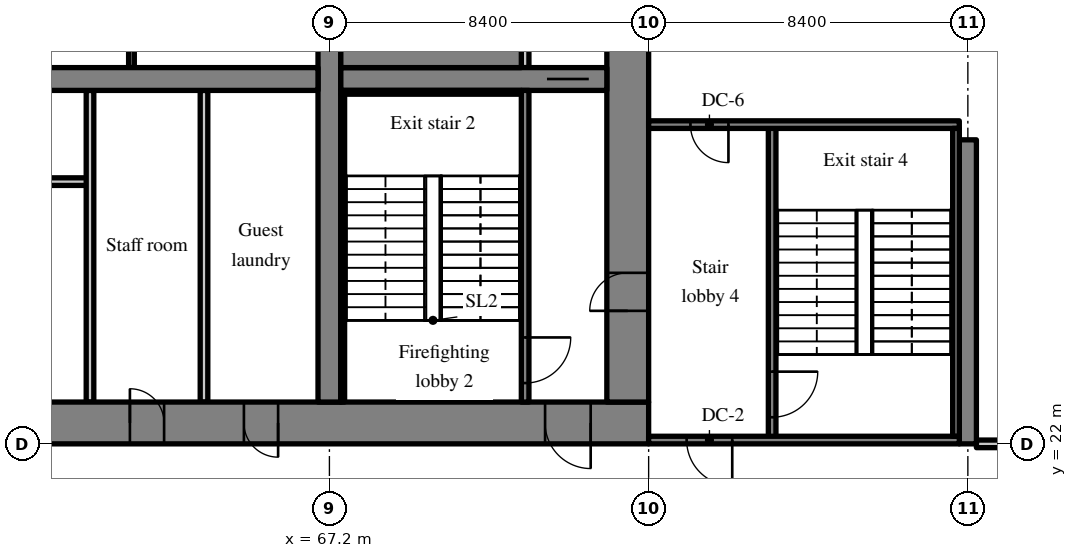
"""IFC4 building model, lengths in metres.
Left out: names, types, materials, properties, quantities, classifications, styles, units other than length and angle.
Written with IfcOpenShell. Run it as: python <this file> out.ifc"""

import sys

from ifc_helpers import new_model, si_unit, direction, frame, frame_2d, origin, place, context, subcontext, project, spatial, rectangle, extrude, source, transform, mapped, element, fill, save


model = new_model("IFC4")
c1 = context("Model", 3, precision=1e-05, world=origin(), true_north=direction((0.0, 1.0)))
c2 = subcontext(c1, "Body", "Model", "MODEL_VIEW")
j1 = project(units=[si_unit("LENGTHUNIT", "METRE"), si_unit("PLANEANGLEUNIT", "RADIAN")], contexts=[c1])
p1 = place(None, origin())
s1 = spatial("IfcSite", under=j1, at=p1, CompositionType="ELEMENT")
p2 = place(p1, origin())
s2 = spatial("IfcBuilding", under=s1, at=p2, CompositionType="ELEMENT")
p3 = place(p2, frame((0.0, 0.0, 43.0)))
s3 = spatial("IfcBuildingStorey", under=s2, at=p3, CompositionType="ELEMENT", Elevation=43.0)
m1 = source(origin(), c2, "Body", "SweptSolid", [
    extrude(rectangle(XDim=50.4, YDim=1.1, at=frame_2d((25.2, 0.0))), origin(), (0.0, 0.0, 1.0), 3.52),
])
p4 = place(p3, frame((25.2, 22.55, 0.0), z_axis=(0.0, 0.0, 1.0), x_axis=(1.0, 0.0, 0.0)))
e1 = element("IfcWall", 1, at=p4, inside=s3, PredefinedType="SHEAR", context=c2, shape_type="MappedRepresentation", body=[
    mapped(m1, transform((0.0, 0.0, 0.0), scale=1.0)),
])
m2 = source(origin(), c2, "Body", "SweptSolid", [
    extrude(rectangle(XDim=1.8, YDim=2.1, at=frame_2d((0.9, 1.05))), frame((0.0, 0.56, 0.0), z_axis=(0.0, -1.0, 0.0), x_axis=(1.0, 0.0, 0.0)), (0.0, 0.0, 1.0), 1.12),
])
p5 = place(p4, frame((15.9, 0.0, 0.0)))
e2 = element("IfcOpeningElement", 2, at=p5, cuts=e1, PredefinedType="OPENING", context=c2, shape_type="MappedRepresentation", body=[
    mapped(m2, transform((0.0, 0.0, 0.0), scale=1.0)),
])
m3 = source(origin(), c2, "Body", "SweptSolid", [
    extrude(rectangle(XDim=1.2, YDim=2.1, at=frame_2d((0.6, 1.05))), frame((0.0, 0.56, 0.0), z_axis=(0.0, -1.0, 0.0), x_axis=(1.0, 0.0, 0.0)), (0.0, 0.0, 1.0), 1.12),
])
p6 = place(p4, frame((27.0, 0.0, 0.0)))
e3 = element("IfcOpeningElement", 3, at=p6, cuts=e1, PredefinedType="OPENING", context=c2, shape_type="MappedRepresentation", body=[
    mapped(m3, transform((0.0, 0.0, 0.0), scale=1.0)),
])
m4 = source(origin(), c2, "Body", "SweptSolid", [
    extrude(rectangle(XDim=0.9, YDim=2.1, at=frame_2d((0.45, 1.05))), frame((0.0, 0.56, 0.0), z_axis=(0.0, -1.0, 0.0), x_axis=(1.0, 0.0, 0.0)), (0.0, 0.0, 1.0), 1.12),
])
p7 = place(p4, frame((33.75, 0.0, 0.0)))
e4 = element("IfcOpeningElement", 4, at=p7, cuts=e1, PredefinedType="OPENING", context=c2, shape_type="MappedRepresentation", body=[
    mapped(m4, transform((0.0, 0.0, 0.0), scale=1.0)),
])
p8 = place(p4, frame((30.75, 0.0, 0.0)))
e5 = element("IfcOpeningElement", 5, at=p8, cuts=e1, PredefinedType="OPENING", context=c2, shape_type="MappedRepresentation", body=[
    mapped(m4, transform((0.0, 0.0, 0.0), scale=1.0)),
])
p9 = place(p4, frame((39.75, 0.0, 0.0)))
e6 = element("IfcOpeningElement", 6, at=p9, cuts=e1, PredefinedType="OPENING", context=c2, shape_type="MappedRepresentation", body=[
    mapped(m4, transform((0.0, 0.0, 0.0), scale=1.0)),
])
p10 = place(p4, frame((36.75, 0.0, 0.0)))
e7 = element("IfcOpeningElement", 7, at=p10, cuts=e1, PredefinedType="OPENING", context=c2, shape_type="MappedRepresentation", body=[
    mapped(m4, transform((0.0, 0.0, 0.0), scale=1.0)),
])
p11 = place(p4, frame((6.425, 0.0, 0.0)))
e8 = element("IfcOpeningElement", 8, at=p11, cuts=e1, PredefinedType="OPENING", context=c2, shape_type="MappedRepresentation", body=[
    mapped(m3, transform((0.0, 0.0, 0.0), scale=1.0)),
])
p12 = place(p4, frame((47.675, 0.0, 0.0)))
e9 = element("IfcOpeningElement", 9, at=p12, cuts=e1, PredefinedType="OPENING", context=c2, shape_type="MappedRepresentation", body=[
    mapped(m3, transform((0.0, 0.0, 0.0), scale=1.0)),
])
m5 = source(origin(), c2, "Body", "SweptSolid", [
    extrude(rectangle(XDim=17.8, YDim=1.1, at=frame_2d((8.9, 0.0))), origin(), (0.0, 0.0, 1.0), 3.52),
])
p13 = place(p3, frame((75.05, 23.1, 0.0), z_axis=(0.0, 0.0, 1.0), x_axis=(0.0, 1.0, 0.0)))
e10 = element("IfcWall", 10, at=p13, inside=s3, PredefinedType="SHEAR", context=c2, shape_type="MappedRepresentation", body=[
    mapped(m5, transform((0.0, 0.0, 0.0), scale=1.0)),
])
m6 = source(origin(), c2, "Body", "SweptSolid", [
    extrude(rectangle(XDim=1.0, YDim=2.1, at=frame_2d((0.5, 1.05))), frame((0.0, 0.56, 0.0), z_axis=(0.0, -1.0, 0.0), x_axis=(1.0, 0.0, 0.0)), (0.0, 0.0, 1.0), 1.12),
])
p14 = place(p13, frame((2.4, 0.0, 0.0)))
e11 = element("IfcOpeningElement", 11, at=p14, cuts=e10, PredefinedType="OPENING", context=c2, shape_type="MappedRepresentation", body=[
    mapped(m6, transform((0.0, 0.0, 0.0), scale=1.0)),
])
p15 = place(p13, frame((12.3, 0.0, 0.0)))
e12 = element("IfcOpeningElement", 12, at=p15, cuts=e10, PredefinedType="OPENING", context=c2, shape_type="MappedRepresentation", body=[
    mapped(m3, transform((0.0, 0.0, 0.0), scale=1.0)),
])
m7 = source(origin(), c2, "Body", "SweptSolid", [
    extrude(rectangle(XDim=17.8, YDim=0.6, at=frame_2d((8.9, 0.0))), origin(), (0.0, 0.0, 1.0), 3.52),
])
p16 = place(p3, frame((67.2, 23.1, 0.0), z_axis=(0.0, 0.0, 1.0), x_axis=(0.0, 1.0, 0.0)))
e13 = element("IfcWall", 13, at=p16, inside=s3, PredefinedType="SHEAR", context=c2, shape_type="MappedRepresentation", body=[
    mapped(m7, transform((0.0, 0.0, 0.0), scale=1.0)),
])
m8 = source(origin(), c2, "Body", "SweptSolid", [
    extrude(rectangle(XDim=16.2, YDim=0.6, at=frame_2d((8.1, 0.0))), origin(), (0.0, 0.0, 1.0), 3.52),
])
p17 = place(p3, frame((50.7, 31.6, 0.0), z_axis=(0.0, 0.0, 1.0), x_axis=(1.0, 0.0, 0.0)))
e14 = element("IfcWall", 14, at=p17, inside=s3, PredefinedType="SHEAR", context=c2, shape_type="MappedRepresentation", body=[
    mapped(m8, transform((0.0, 0.0, 0.0), scale=1.0)),
])
m9 = source(origin(), c2, "Body", "SweptSolid", [
    extrude(rectangle(XDim=1.0, YDim=2.1, at=frame_2d((0.5, 1.05))), frame((0.0, 0.31, 0.0), z_axis=(0.0, -1.0, 0.0), x_axis=(1.0, 0.0, 0.0)), (0.0, 0.0, 1.0), 0.62),
])
p18 = place(p17, frame((0.55, 0.0, 0.0)))
e15 = element("IfcOpeningElement", 15, at=p18, cuts=e14, PredefinedType="OPENING", context=c2, shape_type="MappedRepresentation", body=[
    mapped(m9, transform((0.0, 0.0, 0.0), scale=1.0)),
])
m10 = source(origin(), c2, "Body", "SweptSolid", [
    extrude(rectangle(XDim=7.0, YDim=0.6, at=frame_2d((3.5, 0.0))), origin(), (0.0, 0.0, 1.0), 3.52),
])
p19 = place(p3, frame((67.5, 31.6, 0.0), z_axis=(0.0, 0.0, 1.0), x_axis=(1.0, 0.0, 0.0)))
e16 = element("IfcWall", 16, at=p19, inside=s3, PredefinedType="SHEAR", context=c2, shape_type="MappedRepresentation", body=[
    mapped(m10, transform((0.0, 0.0, 0.0), scale=1.0)),
])
m11 = source(origin(), c2, "Body", "SweptSolid", [
    extrude(rectangle(XDim=1.1, YDim=2.1, at=frame_2d((0.55, 1.05))), frame((0.0, 0.31, 0.0), z_axis=(0.0, -1.0, 0.0), x_axis=(1.0, 0.0, 0.0)), (0.0, 0.0, 1.0), 0.62),
])
p20 = place(p19, frame((5.425, 0.0, 0.0)))
e17 = element("IfcOpeningElement", 17, at=p20, cuts=e16, PredefinedType="OPENING", context=c2, shape_type="MappedRepresentation", body=[
    mapped(m11, transform((0.0, 0.0, 0.0), scale=1.0)),
])
m12 = source(origin(), c2, "Body", "SweptSolid", [
    extrude(rectangle(XDim=8.0, YDim=0.45, at=frame_2d((4.0, 0.0))), origin(), (0.0, 0.0, 1.0), 3.52),
])
p21 = place(p3, frame((84.0, 22.0, 0.0), z_axis=(0.0, 0.0, 1.0), x_axis=(0.0, 1.0, 0.0)))
e18 = element("IfcWall", 18, at=p21, inside=s3, PredefinedType="SHEAR", context=c2, shape_type="MappedRepresentation", body=[
    mapped(m12, transform((0.0, 0.0, 0.0), scale=1.0)),
])
m13 = source(origin(), c2, "Body", "SweptSolid", [
    extrude(rectangle(XDim=6.0, YDim=0.2, at=frame_2d((3.0, 0.0))), origin(), (0.0, 0.0, 1.0), 3.52),
])
p22 = place(p3, frame((60.9, 28.9, 0.0), z_axis=(0.0, 0.0, 1.0), x_axis=(-1.0, 0.0, 0.0)))
e19 = element("IfcWall", 19, at=p22, inside=s3, PredefinedType="SOLIDWALL", context=c2, shape_type="MappedRepresentation", body=[
    mapped(m13, transform((0.0, 0.0, 0.0), scale=1.0)),
])
m14 = source(origin(), c2, "Body", "SweptSolid", [
    extrude(rectangle(XDim=8.2, YDim=0.2, at=frame_2d((4.1, 0.0))), origin(), (0.0, 0.0, 1.0), 3.52),
])
for number, where, z_axis, x_axis in (
    (20, (60.9, 23.1, 0.0), (0.0, 0.0, 1.0), (0.0, 1.0, 0.0)),
    (21, (63.9, 23.1, 0.0), (0.0, 0.0, 1.0), (0.0, 1.0, 0.0)),
):
    element("IfcWall", number, at=place(p3, frame(where, z_axis=z_axis, x_axis=x_axis)), inside=s3, PredefinedType="PARTITIONING", context=c2, shape_type="MappedRepresentation", body=[
        mapped(m14, transform((0.0, 0.0, 0.0), scale=1.0)),
    ])
m15 = source(origin(), c2, "Body", "SweptSolid", [
    extrude(rectangle(XDim=3.1, YDim=0.15, at=frame_2d((1.55, 0.0))), origin(), (0.0, 0.0, 1.0), 3.52),
])
p23 = place(p3, frame((61.991, 31.9, 0.0), z_axis=(0.0, 0.0, 1.0), x_axis=(0.0, 1.0, 0.0)))
e22 = element("IfcWall", 22, at=p23, inside=s3, PredefinedType="PARTITIONING", context=c2, shape_type="MappedRepresentation", body=[
    mapped(m15, transform((0.0, 0.0, 0.0), scale=1.0)),
])
m16 = source(origin(), c2, "Body", "SweptSolid", [
    extrude(rectangle(XDim=8.2, YDim=0.2, at=frame_2d((4.1, 0.0))), origin(), (0.0, 0.0, 1.0), 3.52),
])
p24 = place(p3, frame((72.35, 23.1, 0.0), z_axis=(0.0, 0.0, 1.0), x_axis=(0.0, 1.0, 0.0)))
e23 = element("IfcWall", 23, at=p24, inside=s3, PredefinedType="SOLIDWALL", context=c2, shape_type="MappedRepresentation", body=[
    mapped(m16, transform((0.0, 0.0, 0.0), scale=1.0)),
])
m17 = source(origin(), c2, "Body", "SweptSolid", [
    extrude(rectangle(XDim=1.2, YDim=2.1, at=frame_2d((0.6, 1.05))), frame((0.0, 0.11, 0.0), z_axis=(0.0, -1.0, 0.0), x_axis=(1.0, 0.0, 0.0)), (0.0, 0.0, 1.0), 0.22),
])
p25 = place(p24, frame((0.5, 0.0, 0.0)))
e24 = element("IfcOpeningElement", 24, at=p25, cuts=e23, PredefinedType="OPENING", context=c2, shape_type="MappedRepresentation", body=[
    mapped(m17, transform((0.0, 0.0, 0.0), scale=1.0)),
])
m18 = source(origin(), c2, "Body", "SweptSolid", [
    extrude(rectangle(XDim=1.7, YDim=0.2, at=frame_2d((0.85, 0.0))), origin(), (0.0, 0.0, 1.0), 3.52),
])
p26 = place(p3, frame((72.35, 31.9, 0.0), z_axis=(0.0, 0.0, 1.0), x_axis=(0.0, 1.0, 0.0)))
e25 = element("IfcWall", 25, at=p26, inside=s3, PredefinedType="SOLIDWALL", context=c2, shape_type="MappedRepresentation", body=[
    mapped(m18, transform((0.0, 0.0, 0.0), scale=1.0)),
])
m19 = source(origin(), c2, "Body", "SweptSolid", [
    extrude(rectangle(XDim=8.3, YDim=0.2, at=frame_2d((4.15, 0.0))), origin(), (0.0, 0.0, 1.0), 3.52),
])
p27 = place(p3, frame((78.85, 22.1, 0.0), z_axis=(0.0, 0.0, 1.0), x_axis=(0.0, 1.0, 0.0)))
e26 = element("IfcWall", 26, at=p27, inside=s3, PredefinedType="SOLIDWALL", context=c2, shape_type="MappedRepresentation", body=[
    mapped(m19, transform((0.0, 0.0, 0.0), scale=1.0)),
])
p28 = place(p27, frame((0.6, 0.0, 0.0)))
e27 = element("IfcOpeningElement", 27, at=p28, cuts=e26, PredefinedType="OPENING", context=c2, shape_type="MappedRepresentation", body=[
    mapped(m17, transform((0.0, 0.0, 0.0), scale=1.0)),
])
m20 = source(origin(), c2, "Body", "SweptSolid", [
    extrude(rectangle(XDim=8.175, YDim=0.2, at=frame_2d((4.087, 0.0))), origin(), (0.0, 0.0, 1.0), 3.52),
])
p29 = place(p3, frame((83.775, 22.1, 0.0), z_axis=(0.0, 0.0, 1.0), x_axis=(-1.0, 0.0, 0.0)))
e28 = element("IfcWall", 28, at=p29, inside=s3, PredefinedType="SOLIDWALL", context=c2, shape_type="MappedRepresentation", body=[
    mapped(m20, transform((0.0, 0.0, 0.0), scale=1.0)),
])
p30 = place(p29, frame((5.975, 0.0, 0.0)))
e29 = element("IfcOpeningElement", 29, at=p30, cuts=e28, PredefinedType="OPENING", context=c2, shape_type="MappedRepresentation", body=[
    mapped(m17, transform((0.0, 0.0, 0.0), scale=1.0)),
])
p31 = place(p3, frame((83.775, 30.4, 0.0), z_axis=(0.0, 0.0, 1.0), x_axis=(-1.0, 0.0, 0.0)))
e30 = element("IfcWall", 30, at=p31, inside=s3, PredefinedType="SOLIDWALL", context=c2, shape_type="MappedRepresentation", body=[
    mapped(m20, transform((0.0, 0.0, 0.0), scale=1.0)),
])
m21 = source(origin(), c2, "Body", "SweptSolid", [
    extrude(rectangle(XDim=1.0, YDim=2.1, at=frame_2d((0.5, 1.05))), frame((0.0, 0.11, 0.0), z_axis=(0.0, -1.0, 0.0), x_axis=(1.0, 0.0, 0.0)), (0.0, 0.0, 1.0), 0.22),
])
p32 = place(p31, frame((6.075, 0.0, 0.0)))
e31 = element("IfcOpeningElement", 31, at=p32, cuts=e30, PredefinedType="OPENING", context=c2, shape_type="MappedRepresentation", body=[
    mapped(m21, transform((0.0, 0.0, 0.0), scale=1.0)),
])
m22 = source(origin(), c2, "Body", "SweptSolid", [
    extrude(rectangle(XDim=4.75, YDim=0.1, at=frame_2d((2.375, 0.0))), origin(), (0.0, 0.0, 1.0), 3.52),
])
p33 = place(p3, frame((67.5, 31.25, 0.0), z_axis=(0.0, 0.0, 1.0), x_axis=(1.0, 0.0, 0.0)))
e32 = element("IfcWall", 32, at=p33, inside=s3, PredefinedType="SOLIDWALL", context=c2, shape_type="MappedRepresentation", body=[
    mapped(m22, transform((0.0, 0.0, 0.0), scale=1.0)),
])
m23 = source(origin(), c2, "Body", "SweptSolid", [
    extrude(rectangle(XDim=8.1, YDim=0.1, at=frame_2d((4.05, 0.0))), origin(), (0.0, 0.0, 1.0), 3.52),
])
p34 = place(p3, frame((67.55, 23.1, 0.0), z_axis=(0.0, 0.0, 1.0), x_axis=(0.0, 1.0, 0.0)))
e33 = element("IfcWall", 33, at=p34, inside=s3, PredefinedType="SOLIDWALL", context=c2, shape_type="MappedRepresentation", body=[
    mapped(m23, transform((0.0, 0.0, 0.0), scale=1.0)),
])
m24 = source(origin(), c2, "Body", "SweptSolid", [
    extrude(rectangle(XDim=4.75, YDim=0.9, at=frame_2d((2.375, 0.0))), origin(), (0.0, 0.0, 1.0), 3.52),
])
p35 = place(p3, frame((67.5, 32.35, 0.0), z_axis=(0.0, 0.0, 1.0), x_axis=(1.0, 0.0, 0.0)))
e34 = element("IfcWall", 34, at=p35, inside=s3, PredefinedType="SOLIDWALL", context=c2, shape_type="MappedRepresentation", body=[
    mapped(m24, transform((0.0, 0.0, 0.0), scale=1.0)),
])
m25 = source(origin(), c2, "Body", "SweptSolid", [
    extrude(rectangle(XDim=8.1, YDim=0.175, at=frame_2d((4.05, 0.0))), origin(), (0.0, 0.0, 1.0), 3.52),
])
p36 = place(p3, frame((83.688, 22.2, 0.0), z_axis=(0.0, 0.0, 1.0), x_axis=(0.0, 1.0, 0.0)))
e35 = element("IfcWall", 35, at=p36, inside=s3, PredefinedType="SOLIDWALL", context=c2, shape_type="MappedRepresentation", body=[
    mapped(m25, transform((0.0, 0.0, 0.0), scale=1.0)),
])
m26 = source(origin(), c2, "Body", "SweptSolid", [
    extrude(rectangle(XDim=7.95, YDim=0.2, at=frame_2d((3.975, 0.0))), origin(), (0.0, 0.0, 1.0), 2.82),
])
p37 = place(p3, frame((84.225, 22.0, 0.0), z_axis=(0.0, 0.0, 1.0), x_axis=(1.0, 0.0, 0.0)))
e36 = element("IfcWall", 36, at=p37, inside=s3, PredefinedType="PARTITIONING", context=c2, shape_type="MappedRepresentation", body=[
    mapped(m26, transform((0.0, 0.0, 0.0), scale=1.0)),
])
m27 = source(origin(), c2, "Body", "SweptSolid", [
    extrude(rectangle(XDim=0.9, YDim=2.1, at=frame_2d((0.45, 1.05))), frame((0.0, 0.325, 0.0), z_axis=(0.0, -1.0, 0.0), x_axis=(1.0, 0.0, 0.0)), (0.0, 0.0, 1.0), 0.05),
])
p38 = place(p9, origin())
e37 = element("IfcDoor", 37, at=p38, inside=s3, OperationType="SINGLE_SWING_RIGHT", PredefinedType="DOOR", context=c2, shape_type="MappedRepresentation", body=[
    mapped(m27, transform((0.0, 0.0, 0.0), scale=1.0)),
])
fill(e6, e37)
p39 = place(p10, origin())
e38 = element("IfcDoor", 38, at=p39, inside=s3, OperationType="SINGLE_SWING_LEFT", PredefinedType="DOOR", context=c2, shape_type="MappedRepresentation", body=[
    mapped(m27, transform((0.0, 0.0, 0.0), scale=1.0)),
])
fill(e7, e38)
m28 = source(origin(), c2, "Body", "SweptSolid", [
    extrude(rectangle(XDim=1.2, YDim=2.1, at=frame_2d((0.6, 1.05))), frame((0.0, 0.025, 0.0), z_axis=(0.0, -1.0, 0.0), x_axis=(1.0, 0.0, 0.0)), (0.0, 0.0, 1.0), 0.05),
])
p40 = place(p25, origin())
e39 = element("IfcDoor", 39, at=p40, inside=s3, OperationType="SINGLE_SWING_RIGHT", PredefinedType="DOOR", context=c2, shape_type="MappedRepresentation", body=[
    mapped(m28, transform((0.0, 0.0, 0.0), scale=1.0)),
])
fill(e24, e39)
m29 = source(origin(), c2, "Body", "SweptSolid", [
    extrude(rectangle(XDim=1.2, YDim=2.1, at=frame_2d((0.6, 1.05))), frame((0.0, 0.325, 0.0), z_axis=(0.0, -1.0, 0.0), x_axis=(1.0, 0.0, 0.0)), (0.0, 0.0, 1.0), 0.05),
])
p41 = place(p12, origin())
e40 = element("IfcDoor", 40, at=p41, inside=s3, OperationType="SINGLE_SWING_RIGHT", PredefinedType="DOOR", context=c2, shape_type="MappedRepresentation", body=[
    mapped(m29, transform((0.0, 0.0, 0.0), scale=1.0)),
])
fill(e9, e40)
m30 = source(origin(), c2, "Body", "SweptSolid", [
    extrude(rectangle(XDim=1.1, YDim=2.1, at=frame_2d((0.55, 1.05))), frame((0.0, 0.025, 0.0), z_axis=(0.0, -1.0, 0.0), x_axis=(1.0, 0.0, 0.0)), (0.0, 0.0, 1.0), 0.05),
])
p42 = place(p20, origin())
e41 = element("IfcDoor", 41, at=p42, inside=s3, OperationType="SLIDING_TO_RIGHT", PredefinedType="DOOR", context=c2, shape_type="MappedRepresentation", body=[
    mapped(m30, transform((0.0, 0.0, 0.0), scale=1.0)),
])
fill(e17, e41)
m31 = source(origin(), c2, "Body", "SweptSolid", [
    extrude(rectangle(XDim=1.0, YDim=2.1, at=frame_2d((0.5, 1.05))), frame((0.0, 0.025, 0.0), z_axis=(0.0, -1.0, 0.0), x_axis=(1.0, 0.0, 0.0)), (0.0, 0.0, 1.0), 0.05),
])
p43 = place(p14, origin())
e42 = element("IfcDoor", 42, at=p43, inside=s3, OperationType="SINGLE_SWING_LEFT", PredefinedType="DOOR", context=c2, shape_type="MappedRepresentation", body=[
    mapped(m31, transform((0.0, 0.0, 0.0), scale=1.0)),
])
fill(e11, e42)
p44 = place(p28, origin())
e43 = element("IfcDoor", 43, at=p44, inside=s3, OperationType="SINGLE_SWING_RIGHT", PredefinedType="DOOR", context=c2, shape_type="MappedRepresentation", body=[
    mapped(m28, transform((0.0, 0.0, 0.0), scale=1.0)),
])
fill(e27, e43)
p45 = place(p30, origin())
e44 = element("IfcDoor", 44, at=p45, inside=s3, OperationType="SINGLE_SWING_LEFT", PredefinedType="DOOR", context=c2, shape_type="MappedRepresentation", body=[
    mapped(m28, transform((0.0, 0.0, 0.0), scale=1.0)),
])
fill(e29, e44)
p46 = place(p32, origin())
e45 = element("IfcDoor", 45, at=p46, inside=s3, OperationType="SINGLE_SWING_LEFT", PredefinedType="DOOR", context=c2, shape_type="MappedRepresentation", body=[
    mapped(m31, transform((0.0, 0.0, 0.0), scale=1.0)),
])
fill(e31, e45)
save(model, sys.argv[1])
